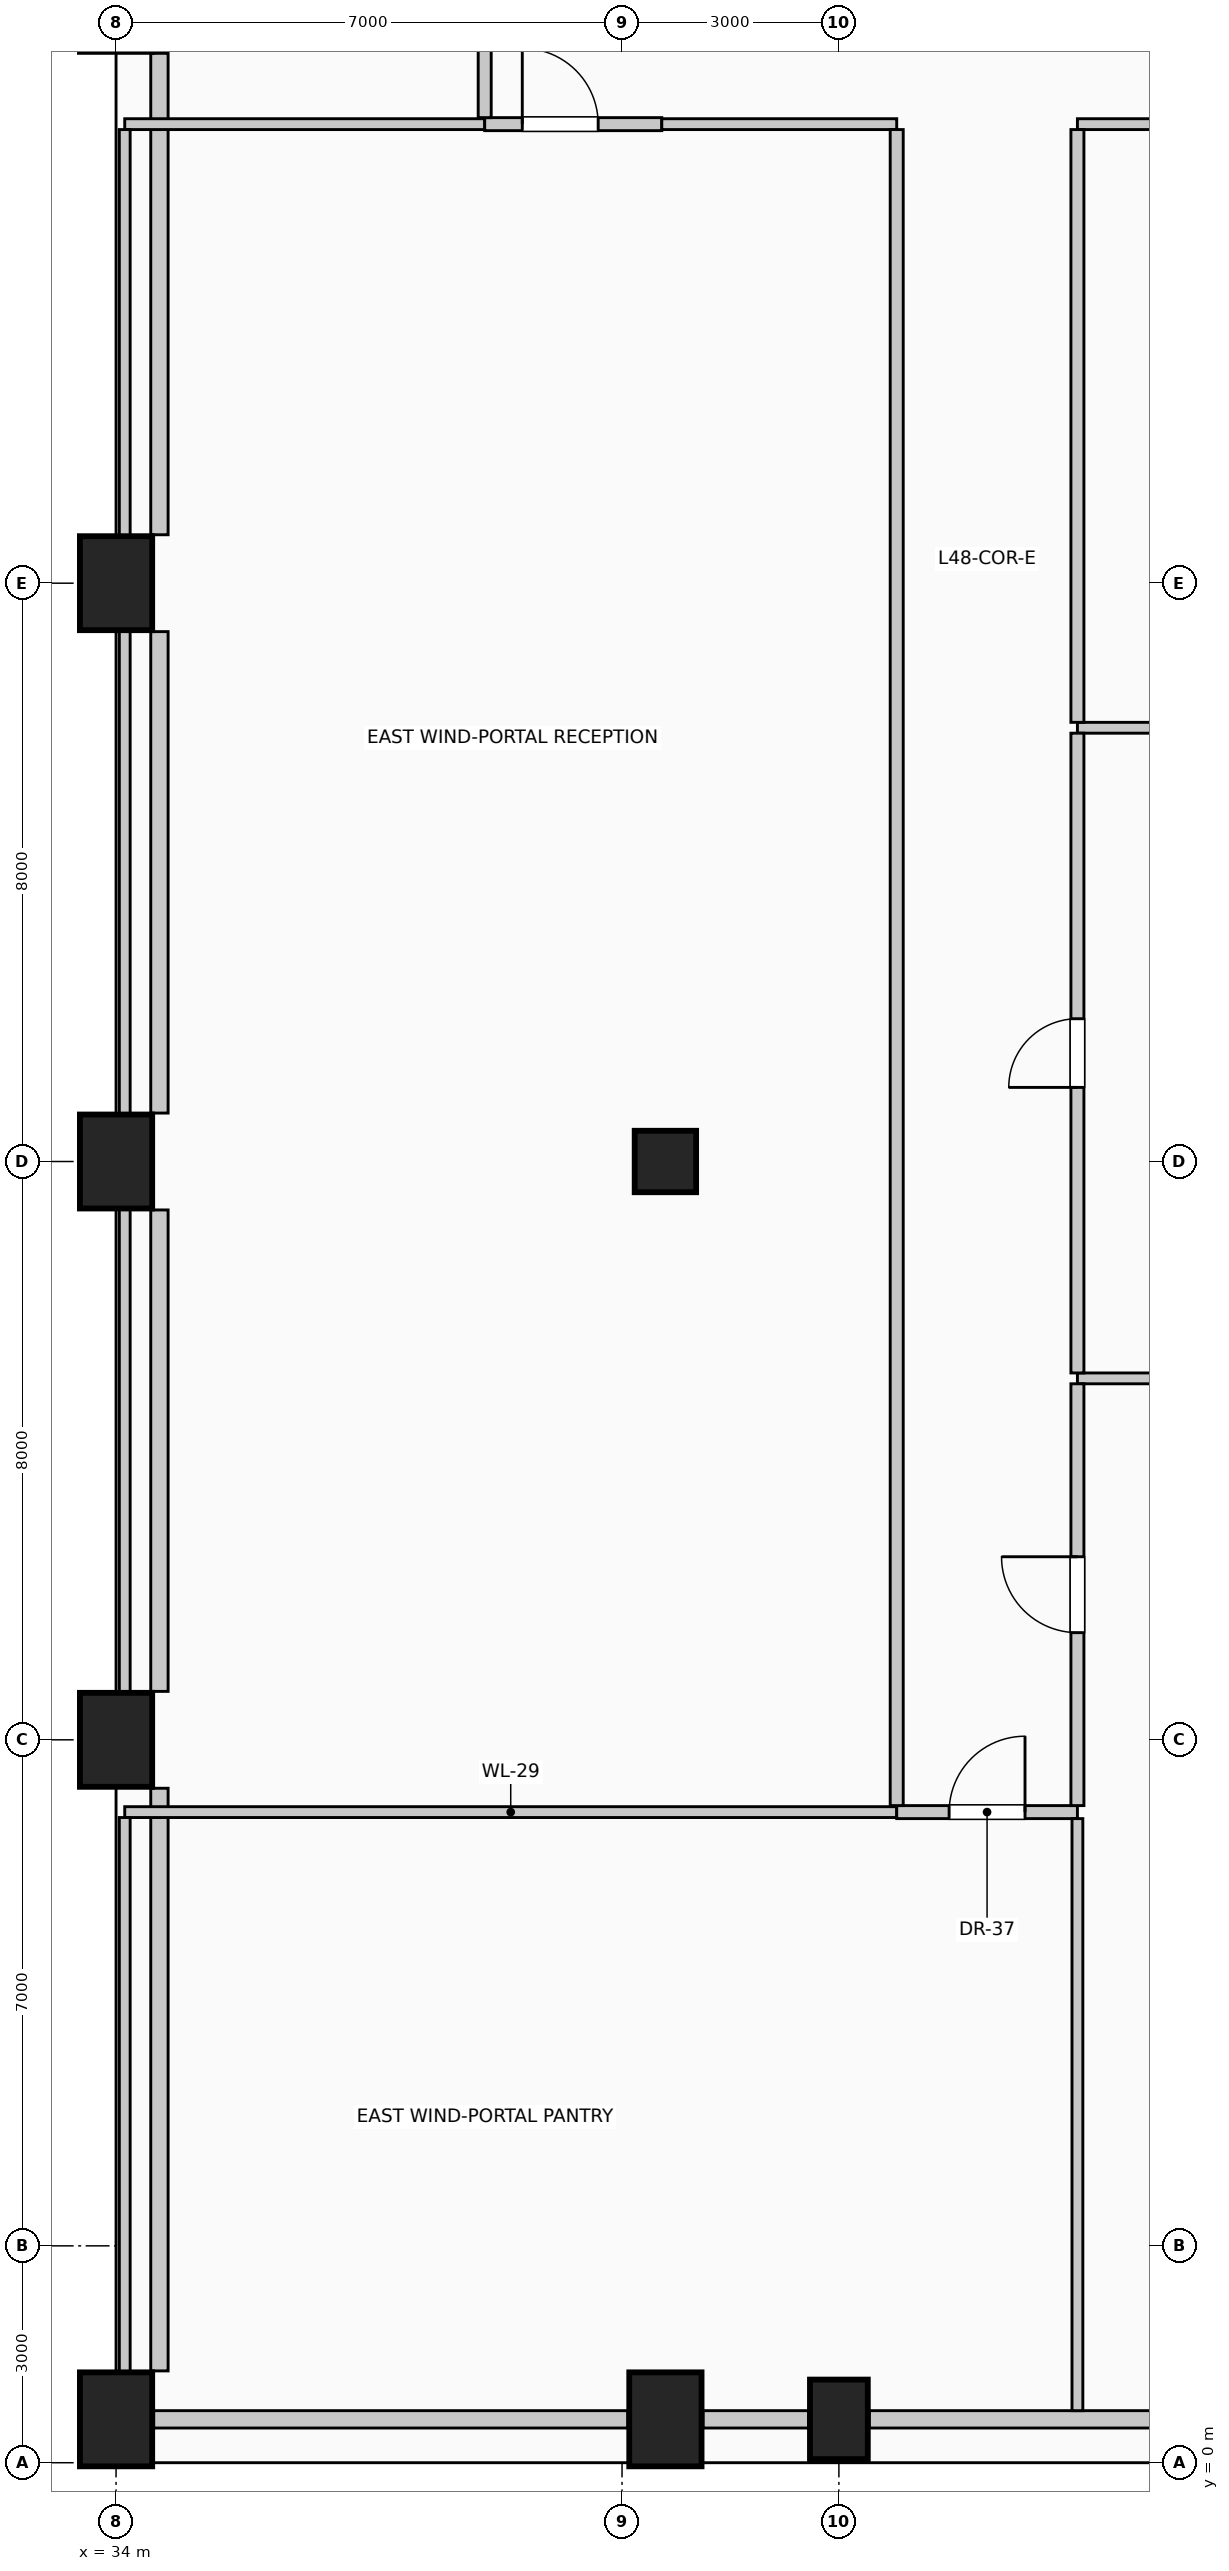
"""IFC4 building model, lengths in metres.
Left out: names, types, materials, properties, quantities, classifications, styles, units other than length and angle.
Written with IfcOpenShell. Run it as: python <this file> out.ifc"""

import sys

from ifc_helpers import new_model, si_unit, direction, frame, frame_2d, origin, origin_2d, place, context, subcontext, project, spatial, rectangle, circle, extrude, element, fill, save


model = new_model("IFC4")
c1 = context("Model", 3, precision=1e-05, world=origin(), true_north=direction((0.0, 1.0)))
c2 = subcontext(c1, "Body", "Model", "MODEL_VIEW")
j1 = project(units=[si_unit("LENGTHUNIT", "METRE"), si_unit("PLANEANGLEUNIT", "RADIAN")], contexts=[c1])
p1 = place(None, origin())
s1 = spatial("IfcSite", under=j1, at=p1, CompositionType="ELEMENT")
p2 = place(p1, origin())
s2 = spatial("IfcBuilding", under=s1, at=p2, CompositionType="ELEMENT")
p3 = place(p2, frame((0.0, 0.0, 198.6)))
s3 = spatial("IfcBuildingStorey", under=s2, at=p3, CompositionType="ELEMENT", Elevation=198.6)
for number, where, z_axis, x_axis in (
    (1, (34.0, 0.6, 0.0), (0.0, 0.0, 1.0), (1.0, 0.0, 0.0)),
    (2, (41.6, 0.6, 0.0), (0.0, 0.0, 1.0), (1.0, 0.0, 0.0)),
):
    element("IfcColumn", number, at=place(p3, frame(where, z_axis=z_axis, x_axis=x_axis)), inside=s3, PredefinedType="COLUMN", context=c2, shape_type="SweptSolid", body=[
        extrude(rectangle(XDim=1.0, YDim=1.3, at=origin_2d()), origin(), (0.0, 0.0, 1.0), 4.0),
    ])
p4 = place(p3, frame((44.0, 0.6, 0.0), z_axis=(0.0, 0.0, 1.0), x_axis=(1.0, 0.0, 0.0)))
e3 = element("IfcColumn", 3, at=p4, inside=s3, PredefinedType="COLUMN", context=c2, shape_type="SweptSolid", body=[
    extrude(rectangle(XDim=0.8, YDim=1.1, at=origin_2d()), origin(), (0.0, 0.0, 1.0), 4.0),
])
for number, where, z_axis, x_axis in (
    (4, (34.0, 10.0, 0.0), (0.0, 0.0, 1.0), (1.0, 0.0, 0.0)),
    (5, (34.0, 18.0, 0.0), (0.0, 0.0, 1.0), (1.0, 0.0, 0.0)),
    (6, (34.0, 26.0, 0.0), (0.0, 0.0, 1.0), (1.0, 0.0, 0.0)),
    (7, (34.0, 34.0, 0.0), (0.0, 0.0, 1.0), (1.0, 0.0, 0.0)),
):
    element("IfcColumn", number, at=place(p3, frame(where, z_axis=z_axis, x_axis=x_axis)), inside=s3, PredefinedType="COLUMN", context=c2, shape_type="SweptSolid", body=[
        extrude(rectangle(XDim=1.0, YDim=1.3, at=origin_2d()), origin(), (0.0, 0.0, 1.0), 4.0),
    ])
p5 = place(p3, frame((41.6, 18.0, 0.0), z_axis=(0.0, 0.0, 1.0), x_axis=(1.0, 0.0, 0.0)))
e8 = element("IfcColumn", 8, at=p5, inside=s3, PredefinedType="COLUMN", context=c2, shape_type="SweptSolid", body=[
    extrude(circle(Radius=0.425, at=origin_2d()), origin(), (0.0, 0.0, 1.0), 4.0),
])
p6 = place(p3, frame((41.08, 0.6, 0.0), z_axis=(0.0, 0.0, 1.0), x_axis=(-1.0, 0.0, 0.0)))
e9 = element("IfcWall", 9, at=p6, inside=s3, PredefinedType="SOLIDWALL", context=c2, shape_type="SweptSolid", body=[
    extrude(rectangle(XDim=6.56, YDim=0.24, at=frame_2d((3.28, 0.0))), origin(), (0.0, 0.0, 1.0), 3.0),
])
p7 = place(p3, frame((43.58, 0.6, 0.0), z_axis=(0.0, 0.0, 1.0), x_axis=(-1.0, 0.0, 0.0)))
e10 = element("IfcWall", 10, at=p7, inside=s3, PredefinedType="SOLIDWALL", context=c2, shape_type="SweptSolid", body=[
    extrude(rectangle(XDim=1.46, YDim=0.24, at=frame_2d((0.73, 0.0))), origin(), (0.0, 0.0, 1.0), 3.0),
])
p8 = place(p3, frame((49.08, 0.6, 0.0), z_axis=(0.0, 0.0, 1.0), x_axis=(-1.0, 0.0, 0.0)))
e11 = element("IfcWall", 11, at=p8, inside=s3, PredefinedType="SOLIDWALL", context=c2, shape_type="SweptSolid", body=[
    extrude(rectangle(XDim=4.66, YDim=0.24, at=frame_2d((2.33, 0.0))), origin(), (0.0, 0.0, 1.0), 3.0),
])
p9 = place(p3, frame((34.6, 1.27, 0.0), z_axis=(0.0, 0.0, 1.0), x_axis=(0.0, 1.0, 0.0)))
e12 = element("IfcWall", 12, at=p9, inside=s3, PredefinedType="SOLIDWALL", context=c2, shape_type="SweptSolid", body=[
    extrude(rectangle(XDim=8.06, YDim=0.24, at=frame_2d((4.03, 0.0))), origin(), (0.0, 0.0, 1.0), 3.75),
])
for number, where, z_axis, x_axis in (
    (13, (34.6, 10.67, 0.0), (0.0, 0.0, 1.0), (0.0, 1.0, 0.0)),
    (14, (34.6, 18.67, 0.0), (0.0, 0.0, 1.0), (0.0, 1.0, 0.0)),
    (15, (34.6, 26.67, 0.0), (0.0, 0.0, 1.0), (0.0, 1.0, 0.0)),
):
    element("IfcWall", number, at=place(p3, frame(where, z_axis=z_axis, x_axis=x_axis)), inside=s3, PredefinedType="SOLIDWALL", context=c2, shape_type="SweptSolid", body=[
        extrude(rectangle(XDim=6.66, YDim=0.24, at=frame_2d((3.33, 0.0))), origin(), (0.0, 0.0, 1.0), 3.75),
    ])
p10 = place(p3, frame((34.12, 9.0, 0.0), z_axis=(0.0, 0.0, 1.0), x_axis=(1.0, 0.0, 0.0)))
e16 = element("IfcWall", 16, at=p10, inside=s3, PredefinedType="PARTITIONING", context=c2, shape_type="SweptSolid", body=[
    extrude(rectangle(XDim=10.68, YDim=0.15, at=frame_2d((5.34, 0.0))), origin(), (0.0, 0.0, 1.0), 3.75),
])
p11 = place(p3, frame((44.8, 9.0, 0.0), z_axis=(0.0, 0.0, 1.0), x_axis=(1.0, 0.0, 0.0)))
e17 = element("IfcWall", 17, at=p11, inside=s3, PredefinedType="PARTITIONING", context=c2, shape_type="SweptSolid", body=[
    extrude(rectangle(XDim=2.5, YDim=0.18, at=frame_2d((1.25, 0.0))), origin(), (0.0, 0.0, 1.0), 3.75),
])
p12 = place(p11, frame((0.725, 0.0, 0.0)))
e18 = element("IfcOpeningElement", 18, at=p12, cuts=e17, PredefinedType="OPENING", context=c2, shape_type="SweptSolid", body=[
    extrude(rectangle(XDim=1.05, YDim=2.15, at=frame_2d((0.525, 1.075))), frame((0.0, 0.1, 0.0), z_axis=(0.0, -1.0, 0.0), x_axis=(1.0, 0.0, 0.0)), (0.0, 0.0, 1.0), 0.2),
])
p13 = place(p3, frame((47.3, 15.0, 0.0), z_axis=(0.0, 0.0, 1.0), x_axis=(1.0, 0.0, 0.0)))
e19 = element("IfcWall", 19, at=p13, inside=s3, PredefinedType="PARTITIONING", context=c2, shape_type="SweptSolid", body=[
    extrude(rectangle(XDim=9.98, YDim=0.15, at=frame_2d((4.99, 0.0))), origin(), (0.0, 0.0, 1.0), 3.245),
])
p14 = place(p3, frame((47.3, 24.0, 0.0), z_axis=(0.0, 0.0, 1.0), x_axis=(1.0, 0.0, 0.0)))
e20 = element("IfcWall", 20, at=p14, inside=s3, PredefinedType="PARTITIONING", context=c2, shape_type="SweptSolid", body=[
    extrude(rectangle(XDim=9.98, YDim=0.15, at=frame_2d((4.99, 0.0))), origin(), (0.0, 0.0, 1.0), 3.75),
])
p15 = place(p3, frame((34.12, 32.35, 0.0), z_axis=(0.0, 0.0, 1.0), x_axis=(1.0, 0.0, 0.0)))
e21 = element("IfcWall", 21, at=p15, inside=s3, PredefinedType="PARTITIONING", context=c2, shape_type="SweptSolid", body=[
    extrude(rectangle(XDim=4.98, YDim=0.15, at=frame_2d((2.49, 0.0))), origin(), (0.0, 0.0, 1.0), 3.75),
])
p16 = place(p3, frame((39.1, 32.35, 0.0), z_axis=(0.0, 0.0, 1.0), x_axis=(1.0, 0.0, 0.0)))
e22 = element("IfcWall", 22, at=p16, inside=s3, PredefinedType="PARTITIONING", context=c2, shape_type="SweptSolid", body=[
    extrude(rectangle(XDim=2.45, YDim=0.18, at=frame_2d((1.225, 0.0))), origin(), (0.0, 0.0, 1.0), 3.75),
])
p17 = place(p16, frame((0.52, 0.0, 0.0)))
e23 = element("IfcOpeningElement", 23, at=p17, cuts=e22, PredefinedType="OPENING", context=c2, shape_type="SweptSolid", body=[
    extrude(rectangle(XDim=1.05, YDim=2.15, at=frame_2d((0.525, 1.075))), frame((0.0, 0.1, 0.0), z_axis=(0.0, -1.0, 0.0), x_axis=(1.0, 0.0, 0.0)), (0.0, 0.0, 1.0), 0.2),
])
p18 = place(p3, frame((41.55, 32.35, 0.0), z_axis=(0.0, 0.0, 1.0), x_axis=(1.0, 0.0, 0.0)))
e24 = element("IfcWall", 24, at=p18, inside=s3, PredefinedType="PARTITIONING", context=c2, shape_type="SweptSolid", body=[
    extrude(rectangle(XDim=3.25, YDim=0.15, at=frame_2d((1.625, 0.0))), origin(), (0.0, 0.0, 1.0), 3.75),
])
p19 = place(p3, frame((47.3, 32.35, 0.0), z_axis=(0.0, 0.0, 1.0), x_axis=(1.0, 0.0, 0.0)))
e25 = element("IfcWall", 25, at=p19, inside=s3, PredefinedType="PARTITIONING", context=c2, shape_type="SweptSolid", body=[
    extrude(rectangle(XDim=7.15, YDim=0.15, at=frame_2d((3.575, 0.0))), origin(), (0.0, 0.0, 1.0), 3.75),
])
p20 = place(p19, frame((3.05, 0.0, 0.0)))
e26 = element("IfcOpeningElement", 26, at=p20, cuts=e25, PredefinedType="OPENING", context=c2, shape_type="SweptSolid", body=[
    extrude(rectangle(XDim=1.05, YDim=2.15, at=frame_2d((0.525, 1.075))), frame((0.0, 0.085, 0.0), z_axis=(0.0, -1.0, 0.0), x_axis=(1.0, 0.0, 0.0)), (0.0, 0.0, 1.0), 0.17),
])
p21 = place(p3, frame((34.12, 1.25, 0.0), z_axis=(0.0, 0.0, 1.0), x_axis=(0.0, 1.0, 0.0)))
e27 = element("IfcWall", 27, at=p21, inside=s3, PredefinedType="PARTITIONING", context=c2, shape_type="SweptSolid", body=[
    extrude(rectangle(XDim=7.675, YDim=0.15, at=frame_2d((3.837, 0.0))), origin(), (0.0, 0.0, 1.0), 3.145),
])
for number, where, z_axis, x_axis in (
    (28, (34.12, 10.65, 0.0), (0.0, 0.0, 1.0), (0.0, 1.0, 0.0)),
    (29, (34.12, 18.65, 0.0), (0.0, 0.0, 1.0), (0.0, 1.0, 0.0)),
):
    element("IfcWall", number, at=place(p3, frame(where, z_axis=z_axis, x_axis=x_axis)), inside=s3, PredefinedType="PARTITIONING", context=c2, shape_type="SweptSolid", body=[
        extrude(rectangle(XDim=6.7, YDim=0.15, at=frame_2d((3.35, 0.0))), origin(), (0.0, 0.0, 1.0), 3.145),
    ])
p22 = place(p3, frame((34.12, 26.65, 0.0), z_axis=(0.0, 0.0, 1.0), x_axis=(0.0, 1.0, 0.0)))
e30 = element("IfcWall", 30, at=p22, inside=s3, PredefinedType="PARTITIONING", context=c2, shape_type="SweptSolid", body=[
    extrude(rectangle(XDim=5.625, YDim=0.15, at=frame_2d((2.812, 0.0))), origin(), (0.0, 0.0, 1.0), 3.145),
])
p23 = place(p3, frame((39.1, 32.44, 0.0), z_axis=(0.0, 0.0, 1.0), x_axis=(0.0, 1.0, 0.0)))
e31 = element("IfcWall", 31, at=p23, inside=s3, PredefinedType="PARTITIONING", context=c2, shape_type="SweptSolid", body=[
    extrude(rectangle(XDim=1.82, YDim=0.18, at=frame_2d((0.91, 0.0))), origin(), (0.0, 0.0, 1.0), 3.75),
])
p24 = place(p3, frame((44.8, 9.09, 0.0), z_axis=(0.0, 0.0, 1.0), x_axis=(0.0, 1.0, 0.0)))
e32 = element("IfcWall", 32, at=p24, inside=s3, PredefinedType="PARTITIONING", context=c2, shape_type="SweptSolid", body=[
    extrude(rectangle(XDim=23.185, YDim=0.18, at=frame_2d((11.592, 0.0))), origin(), (0.0, 0.0, 1.0), 3.75),
])
p25 = place(p3, frame((47.3, 0.72, 0.0), z_axis=(0.0, 0.0, 1.0), x_axis=(0.0, 1.0, 0.0)))
e33 = element("IfcWall", 33, at=p25, inside=s3, PredefinedType="PARTITIONING", context=c2, shape_type="SweptSolid", body=[
    extrude(rectangle(XDim=8.19, YDim=0.15, at=frame_2d((4.095, 0.0))), origin(), (0.0, 0.0, 1.0), 3.75),
])
p26 = place(p3, frame((47.3, 9.09, 0.0), z_axis=(0.0, 0.0, 1.0), x_axis=(0.0, 1.0, 0.0)))
e34 = element("IfcWall", 34, at=p26, inside=s3, PredefinedType="PARTITIONING", context=c2, shape_type="SweptSolid", body=[
    extrude(rectangle(XDim=5.835, YDim=0.18, at=frame_2d((2.917, 0.0))), origin(), (0.0, 0.0, 1.0), 3.75),
])
p27 = place(p26, frame((2.393, 0.0, 0.0)))
e35 = element("IfcOpeningElement", 35, at=p27, cuts=e34, PredefinedType="OPENING", context=c2, shape_type="SweptSolid", body=[
    extrude(rectangle(XDim=1.05, YDim=2.15, at=frame_2d((0.525, 1.075))), frame((0.0, 0.1, 0.0), z_axis=(0.0, -1.0, 0.0), x_axis=(1.0, 0.0, 0.0)), (0.0, 0.0, 1.0), 0.2),
])
p28 = place(p3, frame((47.3, 15.075, 0.0), z_axis=(0.0, 0.0, 1.0), x_axis=(0.0, 1.0, 0.0)))
e36 = element("IfcWall", 36, at=p28, inside=s3, PredefinedType="PARTITIONING", context=c2, shape_type="SweptSolid", body=[
    extrude(rectangle(XDim=8.85, YDim=0.18, at=frame_2d((4.425, 0.0))), origin(), (0.0, 0.0, 1.0), 3.75),
])
p29 = place(p28, frame((3.95, 0.0, 0.0)))
e37 = element("IfcOpeningElement", 37, at=p29, cuts=e36, PredefinedType="OPENING", context=c2, shape_type="SweptSolid", body=[
    extrude(rectangle(XDim=0.95, YDim=2.15, at=frame_2d((0.475, 1.075))), frame((0.0, 0.1, 0.0), z_axis=(0.0, -1.0, 0.0), x_axis=(1.0, 0.0, 0.0)), (0.0, 0.0, 1.0), 0.2),
])
p30 = place(p3, frame((47.3, 24.075, 0.0), z_axis=(0.0, 0.0, 1.0), x_axis=(0.0, 1.0, 0.0)))
e38 = element("IfcWall", 38, at=p30, inside=s3, PredefinedType="PARTITIONING", context=c2, shape_type="SweptSolid", body=[
    extrude(rectangle(XDim=8.2, YDim=0.18, at=frame_2d((4.1, 0.0))), origin(), (0.0, 0.0, 1.0), 3.75),
])
p31 = place(p12, origin())
e39 = element("IfcDoor", 39, at=p31, inside=s3, OperationType="SINGLE_SWING_RIGHT", PredefinedType="DOOR", context=c2, shape_type="SweptSolid", body=[
    extrude(rectangle(XDim=1.05, YDim=2.15, at=frame_2d((0.525, 1.075))), frame((0.0, 0.025, 0.0), z_axis=(0.0, -1.0, 0.0), x_axis=(1.0, 0.0, 0.0)), (0.0, 0.0, 1.0), 0.05),
])
fill(e18, e39)
p32 = place(p17, origin())
e40 = element("IfcDoor", 40, at=p32, inside=s3, OperationType="SINGLE_SWING_LEFT", PredefinedType="DOOR", context=c2, shape_type="SweptSolid", body=[
    extrude(rectangle(XDim=1.05, YDim=2.15, at=frame_2d((0.525, 1.075))), frame((0.0, 0.025, 0.0), z_axis=(0.0, -1.0, 0.0), x_axis=(1.0, 0.0, 0.0)), (0.0, 0.0, 1.0), 0.05),
])
fill(e23, e40)
p33 = place(p27, origin())
e41 = element("IfcDoor", 41, at=p33, inside=s3, OperationType="SINGLE_SWING_RIGHT", PredefinedType="DOOR", context=c2, shape_type="SweptSolid", body=[
    extrude(rectangle(XDim=1.05, YDim=2.15, at=frame_2d((0.525, 1.075))), frame((0.0, 0.025, 0.0), z_axis=(0.0, -1.0, 0.0), x_axis=(1.0, 0.0, 0.0)), (0.0, 0.0, 1.0), 0.05),
])
fill(e35, e41)
p34 = place(p29, origin())
e42 = element("IfcDoor", 42, at=p34, inside=s3, OperationType="SINGLE_SWING_LEFT", PredefinedType="DOOR", context=c2, shape_type="SweptSolid", body=[
    extrude(rectangle(XDim=0.95, YDim=2.15, at=frame_2d((0.475, 1.075))), frame((0.0, 0.025, 0.0), z_axis=(0.0, -1.0, 0.0), x_axis=(1.0, 0.0, 0.0)), (0.0, 0.0, 1.0), 0.05),
])
fill(e37, e42)
save(model, sys.argv[1])
